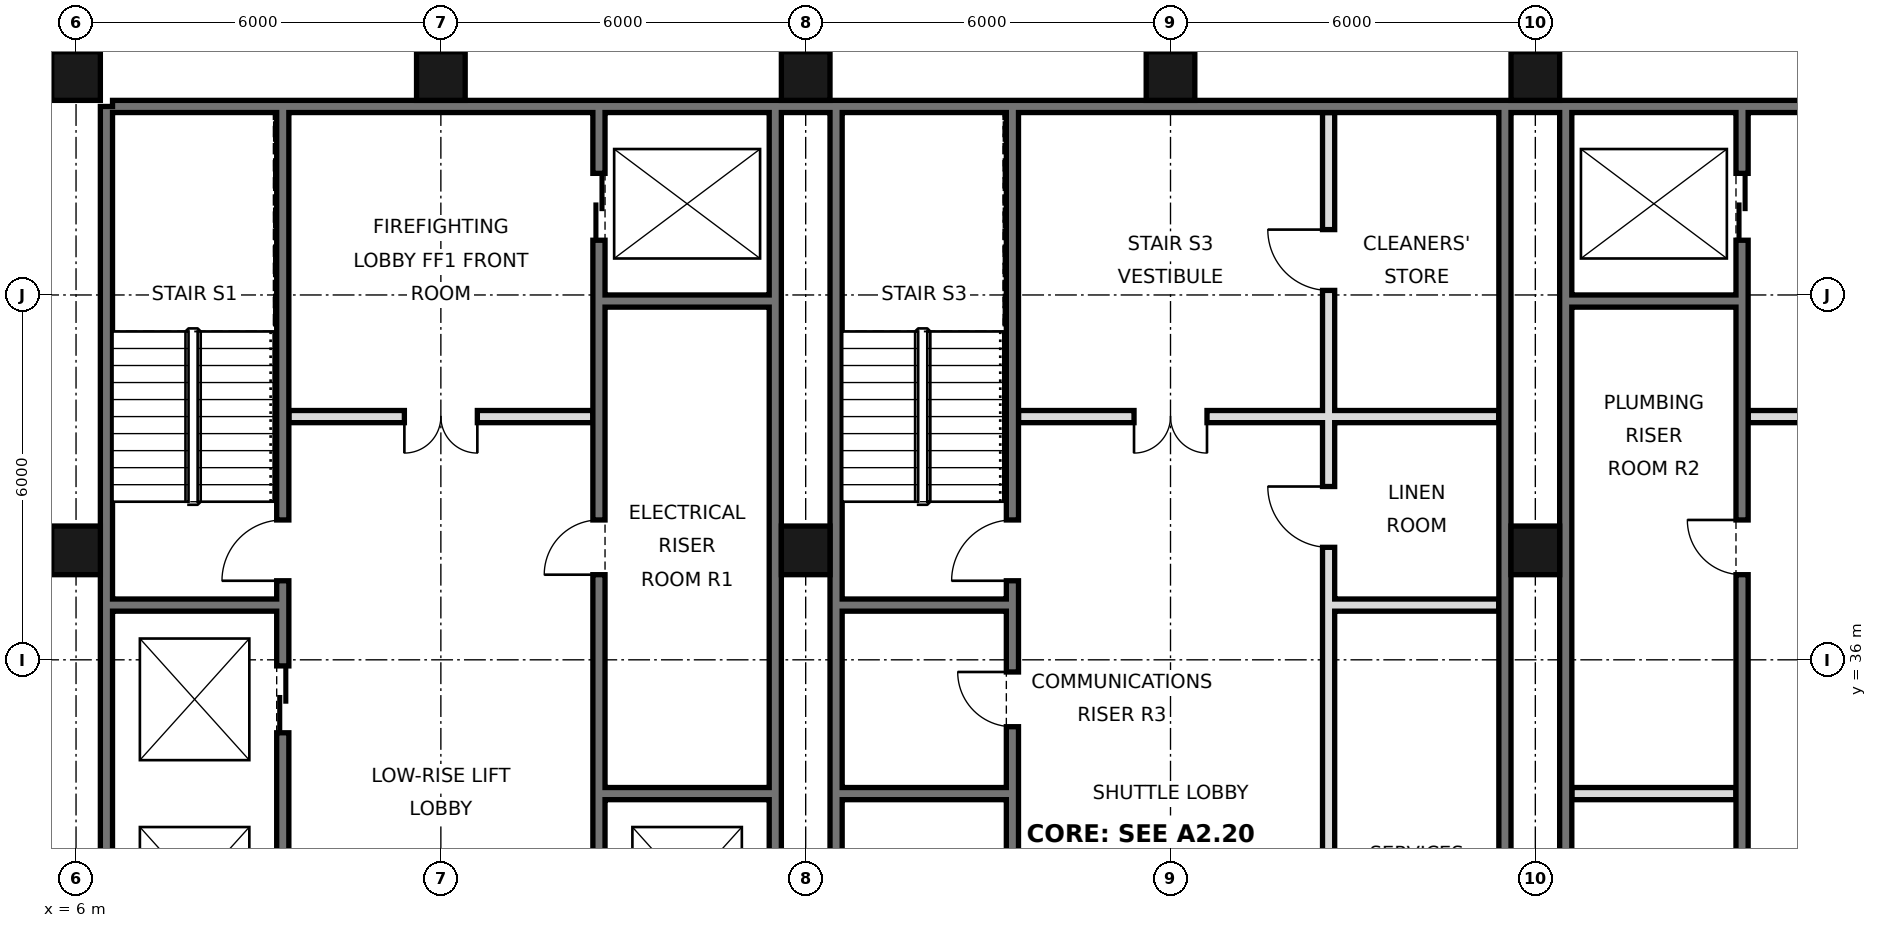
"""IFC4 building model, lengths in metres.
Left out: names, types, materials, properties, quantities, classifications, styles, units other than length and angle.
Written with IfcOpenShell. Run it as: python <this file> out.ifc"""

import sys

from ifc_helpers import new_model, si_unit, direction, frame, frame_2d, origin, origin_2d, place, context, subcontext, project, spatial, rectangle, hollow_rectangle, extrude, element, fill, save


model = new_model("IFC4")
c1 = context("Model", 3, precision=1e-05, world=origin(), true_north=direction((0.0, 1.0)))
c2 = subcontext(c1, "Body", "Model", "MODEL_VIEW")
j1 = project(units=[si_unit("LENGTHUNIT", "METRE"), si_unit("PLANEANGLEUNIT", "RADIAN")], contexts=[c1])
p1 = place(None, origin())
s1 = spatial("IfcSite", under=j1, at=p1, CompositionType="ELEMENT")
p2 = place(p1, origin())
s2 = spatial("IfcBuilding", under=s1, at=p2, CompositionType="ELEMENT")
p3 = place(p2, frame((0.0, 0.0, 78.6)))
s3 = spatial("IfcBuildingStorey", under=s2, at=p3, CompositionType="ELEMENT", Elevation=78.6)
for number, where, z_axis, x_axis in (
    (1, (6.0, 37.8, 0.0), (0.0, 0.0, 1.0), (1.0, 0.0, 0.0)),
    (2, (6.0, 45.6, 0.0), (0.0, 0.0, 1.0), (1.0, 0.0, 0.0)),
    (3, (12.0, 45.6, 0.0), (0.0, 0.0, 1.0), (1.0, 0.0, 0.0)),
    (4, (18.0, 37.8, 0.0), (0.0, 0.0, 1.0), (1.0, 0.0, 0.0)),
    (5, (18.0, 45.6, 0.0), (0.0, 0.0, 1.0), (1.0, 0.0, 0.0)),
    (6, (24.0, 45.6, 0.0), (0.0, 0.0, 1.0), (1.0, 0.0, 0.0)),
    (7, (30.0, 37.8, 0.0), (0.0, 0.0, 1.0), (1.0, 0.0, 0.0)),
    (8, (30.0, 45.6, 0.0), (0.0, 0.0, 1.0), (1.0, 0.0, 0.0)),
):
    element("IfcColumn", number, at=place(p3, frame(where, z_axis=z_axis, x_axis=x_axis)), inside=s3, PredefinedType="COLUMN", context=c2, shape_type="SweptSolid", body=[
        extrude(hollow_rectangle(XDim=0.8, YDim=0.8, WallThickness=0.06, at=origin_2d()), origin(), (0.0, 0.0, 1.0), 3.6),
    ])
p4 = place(p3, frame((6.5, 21.6, 0.0), z_axis=(0.0, 0.0, 1.0), x_axis=(0.0, 1.0, 0.0)))
e9 = element("IfcWall", 9, at=p4, inside=s3, PredefinedType="SOLIDWALL", context=c2, shape_type="SweptSolid", body=[
    extrude(rectangle(XDim=23.5, YDim=0.2, at=frame_2d((11.75, 0.0))), origin(), (0.0, 0.0, 1.0), 3.42),
])
p5 = place(p3, frame((6.6, 45.1, 0.0), z_axis=(0.0, 0.0, 1.0), x_axis=(1.0, 0.0, 0.0)))
e10 = element("IfcWall", 10, at=p5, inside=s3, PredefinedType="SOLIDWALL", context=c2, shape_type="SweptSolid", body=[
    extrude(rectangle(XDim=34.8, YDim=0.2, at=frame_2d((17.4, 0.0))), origin(), (0.0, 0.0, 1.0), 3.42),
])
for number, where, z_axis, x_axis in (
    (11, (17.5, 27.6, 0.0), (0.0, 0.0, 1.0), (0.0, 1.0, 0.0)),
    (12, (18.5, 27.6, 0.0), (0.0, 0.0, 1.0), (0.0, 1.0, 0.0)),
    (13, (29.5, 27.6, 0.0), (0.0, 0.0, 1.0), (0.0, 1.0, 0.0)),
    (14, (30.5, 27.6, 0.0), (0.0, 0.0, 1.0), (0.0, 1.0, 0.0)),
):
    element("IfcWall", number, at=place(p3, frame(where, z_axis=z_axis, x_axis=x_axis)), inside=s3, PredefinedType="SOLIDWALL", context=c2, shape_type="SweptSolid", body=[
        extrude(rectangle(XDim=17.5, YDim=0.2, at=frame_2d((8.75, 0.0))), origin(), (0.0, 0.0, 1.0), 3.42),
    ])
p6 = place(p3, frame((14.6, 27.5, 0.0), z_axis=(0.0, 0.0, 1.0), x_axis=(0.0, 1.0, 0.0)))
e15 = element("IfcWall", 15, at=p6, inside=s3, PredefinedType="SOLIDWALL", context=c2, shape_type="SweptSolid", body=[
    extrude(rectangle(XDim=17.5, YDim=0.2, at=frame_2d((8.75, 0.0))), origin(), (0.0, 0.0, 1.0), 3.42),
])
p7 = place(p6, frame((1.1, 0.0, 0.0)))
e16 = element("IfcOpeningElement", 16, at=p7, cuts=e15, PredefinedType="OPENING", context=c2, shape_type="SweptSolid", body=[
    extrude(rectangle(XDim=1.1, YDim=2.1, at=frame_2d((0.55, 1.05))), frame((0.0, 0.11, 0.0), z_axis=(0.0, -1.0, 0.0), x_axis=(1.0, 0.0, 0.0)), (0.0, 0.0, 1.0), 0.22),
])
p8 = place(p6, frame((4.2, 0.0, 0.0)))
e17 = element("IfcOpeningElement", 17, at=p8, cuts=e15, PredefinedType="OPENING", context=c2, shape_type="SweptSolid", body=[
    extrude(rectangle(XDim=1.1, YDim=2.1, at=frame_2d((0.55, 1.05))), frame((0.0, 0.11, 0.0), z_axis=(0.0, -1.0, 0.0), x_axis=(1.0, 0.0, 0.0)), (0.0, 0.0, 1.0), 0.22),
])
p9 = place(p6, frame((15.4, 0.0, 0.0)))
e18 = element("IfcOpeningElement", 18, at=p9, cuts=e15, PredefinedType="OPENING", context=c2, shape_type="SweptSolid", body=[
    extrude(rectangle(XDim=1.1, YDim=2.1, at=frame_2d((0.55, 1.05))), frame((0.0, 0.11, 0.0), z_axis=(0.0, -1.0, 0.0), x_axis=(1.0, 0.0, 0.0)), (0.0, 0.0, 1.0), 0.22),
])
p10 = place(p6, frame((9.9, 0.0, 0.0)))
e19 = element("IfcOpeningElement", 19, at=p10, cuts=e15, PredefinedType="OPENING", context=c2, shape_type="SweptSolid", body=[
    extrude(rectangle(XDim=0.9, YDim=2.1, at=frame_2d((0.45, 1.05))), frame((0.0, 0.11, 0.0), z_axis=(0.0, -1.0, 0.0), x_axis=(1.0, 0.0, 0.0)), (0.0, 0.0, 1.0), 0.22),
])
p11 = place(p3, frame((21.4, 27.5, 0.0), z_axis=(0.0, 0.0, 1.0), x_axis=(0.0, 1.0, 0.0)))
e20 = element("IfcWall", 20, at=p11, inside=s3, PredefinedType="SOLIDWALL", context=c2, shape_type="SweptSolid", body=[
    extrude(rectangle(XDim=17.5, YDim=0.2, at=frame_2d((8.75, 0.0))), origin(), (0.0, 0.0, 1.0), 3.42),
])
p12 = place(p11, frame((9.8, 0.0, 0.0)))
e21 = element("IfcOpeningElement", 21, at=p12, cuts=e20, PredefinedType="OPENING", context=c2, shape_type="SweptSolid", body=[
    extrude(rectangle(XDim=1.0, YDim=2.1, at=frame_2d((0.5, 1.05))), frame((0.0, 0.11, 0.0), z_axis=(0.0, -1.0, 0.0), x_axis=(1.0, 0.0, 0.0)), (0.0, 0.0, 1.0), 0.22),
])
p13 = place(p11, frame((7.4, 0.0, 0.0)))
e22 = element("IfcOpeningElement", 22, at=p13, cuts=e20, PredefinedType="OPENING", context=c2, shape_type="SweptSolid", body=[
    extrude(rectangle(XDim=0.9, YDim=2.1, at=frame_2d((0.45, 1.05))), frame((0.0, 0.11, 0.0), z_axis=(0.0, -1.0, 0.0), x_axis=(1.0, 0.0, 0.0)), (0.0, 0.0, 1.0), 0.22),
])
p14 = place(p3, frame((26.6, 27.5, 0.0), z_axis=(0.0, 0.0, 1.0), x_axis=(0.0, 1.0, 0.0)))
e23 = element("IfcWall", 23, at=p14, inside=s3, PredefinedType="SOLIDWALL", context=c2, shape_type="SweptSolid", body=[
    extrude(rectangle(XDim=17.5, YDim=0.2, at=frame_2d((8.75, 0.0))), origin(), (0.0, 0.0, 1.0), 3.42),
])
p15 = place(p14, frame((4.3, 0.0, 0.0)))
e24 = element("IfcOpeningElement", 24, at=p15, cuts=e23, PredefinedType="OPENING", context=c2, shape_type="SweptSolid", body=[
    extrude(rectangle(XDim=0.9, YDim=2.1, at=frame_2d((0.45, 1.05))), frame((0.0, 0.11, 0.0), z_axis=(0.0, -1.0, 0.0), x_axis=(1.0, 0.0, 0.0)), (0.0, 0.0, 1.0), 0.22),
])
p16 = place(p14, frame((10.35, 0.0, 0.0)))
e25 = element("IfcOpeningElement", 25, at=p16, cuts=e23, PredefinedType="OPENING", context=c2, shape_type="SweptSolid", body=[
    extrude(rectangle(XDim=1.0, YDim=2.1, at=frame_2d((0.5, 1.05))), frame((0.0, 0.11, 0.0), z_axis=(0.0, -1.0, 0.0), x_axis=(1.0, 0.0, 0.0)), (0.0, 0.0, 1.0), 0.22),
])
p17 = place(p14, frame((14.575, 0.0, 0.0)))
e26 = element("IfcOpeningElement", 26, at=p17, cuts=e23, PredefinedType="OPENING", context=c2, shape_type="SweptSolid", body=[
    extrude(rectangle(XDim=1.0, YDim=2.1, at=frame_2d((0.5, 1.05))), frame((0.0, 0.11, 0.0), z_axis=(0.0, -1.0, 0.0), x_axis=(1.0, 0.0, 0.0)), (0.0, 0.0, 1.0), 0.22),
])
p18 = place(p3, frame((33.4, 27.5, 0.0), z_axis=(0.0, 0.0, 1.0), x_axis=(0.0, 1.0, 0.0)))
e27 = element("IfcWall", 27, at=p18, inside=s3, PredefinedType="SOLIDWALL", context=c2, shape_type="SweptSolid", body=[
    extrude(rectangle(XDim=17.5, YDim=0.2, at=frame_2d((8.75, 0.0))), origin(), (0.0, 0.0, 1.0), 3.42),
])
p19 = place(p18, frame((15.4, 0.0, 0.0)))
e28 = element("IfcOpeningElement", 28, at=p19, cuts=e27, PredefinedType="OPENING", context=c2, shape_type="SweptSolid", body=[
    extrude(rectangle(XDim=1.1, YDim=2.1, at=frame_2d((0.55, 1.05))), frame((0.0, 0.11, 0.0), z_axis=(0.0, -1.0, 0.0), x_axis=(1.0, 0.0, 0.0)), (0.0, 0.0, 1.0), 0.22),
])
p20 = place(p18, frame((2.7, 0.0, 0.0)))
e29 = element("IfcOpeningElement", 29, at=p20, cuts=e27, PredefinedType="OPENING", context=c2, shape_type="SweptSolid", body=[
    extrude(rectangle(XDim=1.0, YDim=2.1, at=frame_2d((0.5, 1.05))), frame((0.0, 0.11, 0.0), z_axis=(0.0, -1.0, 0.0), x_axis=(1.0, 0.0, 0.0)), (0.0, 0.0, 1.0), 0.22),
])
p21 = place(p18, frame((9.9, 0.0, 0.0)))
e30 = element("IfcOpeningElement", 30, at=p21, cuts=e27, PredefinedType="OPENING", context=c2, shape_type="SweptSolid", body=[
    extrude(rectangle(XDim=0.9, YDim=2.1, at=frame_2d((0.45, 1.05))), frame((0.0, 0.11, 0.0), z_axis=(0.0, -1.0, 0.0), x_axis=(1.0, 0.0, 0.0)), (0.0, 0.0, 1.0), 0.22),
])
p22 = place(p3, frame((9.4, 21.6, 0.0), z_axis=(0.0, 0.0, 1.0), x_axis=(0.0, 1.0, 0.0)))
e31 = element("IfcWall", 31, at=p22, inside=s3, PredefinedType="SOLIDWALL", context=c2, shape_type="SweptSolid", body=[
    extrude(rectangle(XDim=23.4, YDim=0.2, at=frame_2d((11.7, 0.0))), origin(), (0.0, 0.0, 1.0), 3.42),
])
p23 = place(p22, frame((7.0, 0.0, 0.0)))
e32 = element("IfcOpeningElement", 32, at=p23, cuts=e31, PredefinedType="OPENING", context=c2, shape_type="SweptSolid", body=[
    extrude(rectangle(XDim=1.1, YDim=2.1, at=frame_2d((0.55, 1.05))), frame((0.0, 0.11, 0.0), z_axis=(0.0, -1.0, 0.0), x_axis=(1.0, 0.0, 0.0)), (0.0, 0.0, 1.0), 0.22),
])
p24 = place(p22, frame((10.1, 0.0, 0.0)))
e33 = element("IfcOpeningElement", 33, at=p24, cuts=e31, PredefinedType="OPENING", context=c2, shape_type="SweptSolid", body=[
    extrude(rectangle(XDim=1.1, YDim=2.1, at=frame_2d((0.55, 1.05))), frame((0.0, 0.11, 0.0), z_axis=(0.0, -1.0, 0.0), x_axis=(1.0, 0.0, 0.0)), (0.0, 0.0, 1.0), 0.22),
])
p25 = place(p22, frame((13.2, 0.0, 0.0)))
e34 = element("IfcOpeningElement", 34, at=p25, cuts=e31, PredefinedType="OPENING", context=c2, shape_type="SweptSolid", body=[
    extrude(rectangle(XDim=1.1, YDim=2.1, at=frame_2d((0.55, 1.05))), frame((0.0, 0.11, 0.0), z_axis=(0.0, -1.0, 0.0), x_axis=(1.0, 0.0, 0.0)), (0.0, 0.0, 1.0), 0.22),
])
p26 = place(p22, frame((15.7, 0.0, 0.0)))
e35 = element("IfcOpeningElement", 35, at=p26, cuts=e31, PredefinedType="OPENING", context=c2, shape_type="SweptSolid", body=[
    extrude(rectangle(XDim=1.0, YDim=2.1, at=frame_2d((0.5, 1.05))), frame((0.0, 0.11, 0.0), z_axis=(0.0, -1.0, 0.0), x_axis=(1.0, 0.0, 0.0)), (0.0, 0.0, 1.0), 0.22),
])
p27 = place(p22, frame((0.175, 0.0, 0.0)))
e36 = element("IfcOpeningElement", 36, at=p27, cuts=e31, PredefinedType="OPENING", context=c2, shape_type="SweptSolid", body=[
    extrude(rectangle(XDim=0.9, YDim=2.1, at=frame_2d((0.45, 1.05))), frame((0.0, 0.11, 0.0), z_axis=(0.0, -1.0, 0.0), x_axis=(1.0, 0.0, 0.0)), (0.0, 0.0, 1.0), 0.22),
])
for number, where, z_axis, x_axis in (
    (37, (14.7, 33.8, 0.0), (0.0, 0.0, 1.0), (1.0, 0.0, 0.0)),
    (38, (18.6, 33.8, 0.0), (0.0, 0.0, 1.0), (1.0, 0.0, 0.0)),
    (39, (30.6, 33.8, 0.0), (0.0, 0.0, 1.0), (1.0, 0.0, 0.0)),
    (40, (18.6, 36.9, 0.0), (0.0, 0.0, 1.0), (1.0, 0.0, 0.0)),
    (41, (26.7, 36.9, 0.0), (0.0, 0.0, 1.0), (1.0, 0.0, 0.0)),
    (42, (6.6, 36.9, 0.0), (0.0, 0.0, 1.0), (1.0, 0.0, 0.0)),
):
    element("IfcWall", number, at=place(p3, frame(where, z_axis=z_axis, x_axis=x_axis)), inside=s3, PredefinedType="SOLIDWALL", context=c2, shape_type="SweptSolid", body=[
        extrude(rectangle(XDim=2.7, YDim=0.2, at=frame_2d((1.35, 0.0))), origin(), (0.0, 0.0, 1.0), 3.42),
    ])
p28 = place(p3, frame((21.5, 40.0, 0.0), z_axis=(0.0, 0.0, 1.0), x_axis=(1.0, 0.0, 0.0)))
e43 = element("IfcWall", 43, at=p28, inside=s3, PredefinedType="PARTITIONING", context=c2, shape_type="SweptSolid", body=[
    extrude(rectangle(XDim=7.9, YDim=0.2, at=frame_2d((3.95, 0.0))), origin(), (0.0, 0.0, 1.0), 3.42),
])
p29 = place(p28, frame((1.9, 0.0, 0.0)))
e44 = element("IfcOpeningElement", 44, at=p29, cuts=e43, PredefinedType="OPENING", context=c2, shape_type="SweptSolid", body=[
    extrude(rectangle(XDim=1.2, YDim=2.1, at=frame_2d((0.6, 1.05))), frame((0.0, 0.11, 0.0), z_axis=(0.0, -1.0, 0.0), x_axis=(1.0, 0.0, 0.0)), (0.0, 0.0, 1.0), 0.22),
])
p30 = place(p3, frame((33.5, 40.0, 0.0), z_axis=(0.0, 0.0, 1.0), x_axis=(1.0, 0.0, 0.0)))
e45 = element("IfcWall", 45, at=p30, inside=s3, PredefinedType="PARTITIONING", context=c2, shape_type="SweptSolid", body=[
    extrude(rectangle(XDim=5.0, YDim=0.2, at=frame_2d((2.5, 0.0))), origin(), (0.0, 0.0, 1.0), 3.42),
])
p31 = place(p30, frame((1.9, 0.0, 0.0)))
e46 = element("IfcOpeningElement", 46, at=p31, cuts=e45, PredefinedType="OPENING", context=c2, shape_type="SweptSolid", body=[
    extrude(rectangle(XDim=1.2, YDim=2.1, at=frame_2d((0.6, 1.05))), frame((0.0, 0.11, 0.0), z_axis=(0.0, -1.0, 0.0), x_axis=(1.0, 0.0, 0.0)), (0.0, 0.0, 1.0), 0.22),
])
p32 = place(p3, frame((9.5, 40.0, 0.0), z_axis=(0.0, 0.0, 1.0), x_axis=(1.0, 0.0, 0.0)))
e47 = element("IfcWall", 47, at=p32, inside=s3, PredefinedType="PARTITIONING", context=c2, shape_type="SweptSolid", body=[
    extrude(rectangle(XDim=5.0, YDim=0.2, at=frame_2d((2.5, 0.0))), origin(), (0.0, 0.0, 1.0), 3.42),
])
p33 = place(p32, frame((1.9, 0.0, 0.0)))
e48 = element("IfcOpeningElement", 48, at=p33, cuts=e47, PredefinedType="OPENING", context=c2, shape_type="SweptSolid", body=[
    extrude(rectangle(XDim=1.2, YDim=2.1, at=frame_2d((0.6, 1.05))), frame((0.0, 0.11, 0.0), z_axis=(0.0, -1.0, 0.0), x_axis=(1.0, 0.0, 0.0)), (0.0, 0.0, 1.0), 0.22),
])
for number, where, z_axis, x_axis in (
    (49, (14.7, 41.9, 0.0), (0.0, 0.0, 1.0), (1.0, 0.0, 0.0)),
    (50, (30.6, 41.9, 0.0), (0.0, 0.0, 1.0), (1.0, 0.0, 0.0)),
):
    element("IfcWall", number, at=place(p3, frame(where, z_axis=z_axis, x_axis=x_axis)), inside=s3, PredefinedType="SOLIDWALL", context=c2, shape_type="SweptSolid", body=[
        extrude(rectangle(XDim=2.7, YDim=0.2, at=frame_2d((1.35, 0.0))), origin(), (0.0, 0.0, 1.0), 3.42),
    ])
p34 = place(p33, frame((1.2, 0.0, 0.0), z_axis=(0.0, 0.0, 1.0), x_axis=(-1.0, 0.0, 0.0)))
e51 = element("IfcDoor", 51, at=p34, inside=s3, OperationType="DOUBLE_DOOR_SINGLE_SWING", PredefinedType="DOOR", context=c2, shape_type="SweptSolid", body=[
    extrude(rectangle(XDim=1.2, YDim=2.1, at=frame_2d((0.6, 1.05))), frame((0.0, 0.025, 0.0), z_axis=(0.0, -1.0, 0.0), x_axis=(1.0, 0.0, 0.0)), (0.0, 0.0, 1.0), 0.05),
])
fill(e48, e51)
p35 = place(p29, frame((1.2, 0.0, 0.0), z_axis=(0.0, 0.0, 1.0), x_axis=(-1.0, 0.0, 0.0)))
e52 = element("IfcDoor", 52, at=p35, inside=s3, OperationType="DOUBLE_DOOR_SINGLE_SWING", PredefinedType="DOOR", context=c2, shape_type="SweptSolid", body=[
    extrude(rectangle(XDim=1.2, YDim=2.1, at=frame_2d((0.6, 1.05))), frame((0.0, 0.025, 0.0), z_axis=(0.0, -1.0, 0.0), x_axis=(1.0, 0.0, 0.0)), (0.0, 0.0, 1.0), 0.05),
])
fill(e44, e52)
p36 = place(p19, origin())
e53 = element("IfcDoor", 53, at=p36, inside=s3, OperationType="DOUBLE_DOOR_SLIDING", PredefinedType="DOOR", context=c2, shape_type="SweptSolid", body=[
    extrude(rectangle(XDim=1.1, YDim=2.1, at=frame_2d((0.55, 1.05))), frame((0.0, 0.025, 0.0), z_axis=(0.0, -1.0, 0.0), x_axis=(1.0, 0.0, 0.0)), (0.0, 0.0, 1.0), 0.05),
])
fill(e28, e53)
p37 = place(p9, origin())
e54 = element("IfcDoor", 54, at=p37, inside=s3, OperationType="DOUBLE_DOOR_SLIDING", PredefinedType="DOOR", context=c2, shape_type="SweptSolid", body=[
    extrude(rectangle(XDim=1.1, YDim=2.1, at=frame_2d((0.55, 1.05))), frame((0.0, 0.025, 0.0), z_axis=(0.0, -1.0, 0.0), x_axis=(1.0, 0.0, 0.0)), (0.0, 0.0, 1.0), 0.05),
])
fill(e18, e54)
p38 = place(p25, origin())
e55 = element("IfcDoor", 55, at=p38, inside=s3, OperationType="DOUBLE_DOOR_SLIDING", PredefinedType="DOOR", context=c2, shape_type="SweptSolid", body=[
    extrude(rectangle(XDim=1.1, YDim=2.1, at=frame_2d((0.55, 1.05))), frame((0.0, 0.025, 0.0), z_axis=(0.0, -1.0, 0.0), x_axis=(1.0, 0.0, 0.0)), (0.0, 0.0, 1.0), 0.05),
])
fill(e34, e55)
p39 = place(p26, origin())
e56 = element("IfcDoor", 56, at=p39, inside=s3, OperationType="SINGLE_SWING_LEFT", PredefinedType="DOOR", context=c2, shape_type="SweptSolid", body=[
    extrude(rectangle(XDim=1.0, YDim=2.1, at=frame_2d((0.5, 1.05))), frame((0.0, 0.025, 0.0), z_axis=(0.0, -1.0, 0.0), x_axis=(1.0, 0.0, 0.0)), (0.0, 0.0, 1.0), 0.05),
])
fill(e35, e56)
p40 = place(p12, origin())
e57 = element("IfcDoor", 57, at=p40, inside=s3, OperationType="SINGLE_SWING_LEFT", PredefinedType="DOOR", context=c2, shape_type="SweptSolid", body=[
    extrude(rectangle(XDim=1.0, YDim=2.1, at=frame_2d((0.5, 1.05))), frame((0.0, 0.025, 0.0), z_axis=(0.0, -1.0, 0.0), x_axis=(1.0, 0.0, 0.0)), (0.0, 0.0, 1.0), 0.05),
])
fill(e21, e57)
p41 = place(p10, origin())
e58 = element("IfcDoor", 58, at=p41, inside=s3, OperationType="SINGLE_SWING_LEFT", PredefinedType="DOOR", context=c2, shape_type="SweptSolid", body=[
    extrude(rectangle(XDim=0.9, YDim=2.1, at=frame_2d((0.45, 1.05))), frame((0.0, 0.025, 0.0), z_axis=(0.0, -1.0, 0.0), x_axis=(1.0, 0.0, 0.0)), (0.0, 0.0, 1.0), 0.05),
])
fill(e19, e58)
p42 = place(p21, frame((0.9, 0.0, 0.0), z_axis=(0.0, 0.0, 1.0), x_axis=(-1.0, 0.0, 0.0)))
e59 = element("IfcDoor", 59, at=p42, inside=s3, OperationType="SINGLE_SWING_LEFT", PredefinedType="DOOR", context=c2, shape_type="SweptSolid", body=[
    extrude(rectangle(XDim=0.9, YDim=2.1, at=frame_2d((0.45, 1.05))), frame((0.0, 0.025, 0.0), z_axis=(0.0, -1.0, 0.0), x_axis=(1.0, 0.0, 0.0)), (0.0, 0.0, 1.0), 0.05),
])
fill(e30, e59)
p43 = place(p13, frame((0.9, 0.0, 0.0), z_axis=(0.0, 0.0, 1.0), x_axis=(-1.0, 0.0, 0.0)))
e60 = element("IfcDoor", 60, at=p43, inside=s3, OperationType="SINGLE_SWING_LEFT", PredefinedType="DOOR", context=c2, shape_type="SweptSolid", body=[
    extrude(rectangle(XDim=0.9, YDim=2.1, at=frame_2d((0.45, 1.05))), frame((0.0, 0.025, 0.0), z_axis=(0.0, -1.0, 0.0), x_axis=(1.0, 0.0, 0.0)), (0.0, 0.0, 1.0), 0.05),
])
fill(e22, e60)
p44 = place(p16, frame((1.0, 0.0, 0.0), z_axis=(0.0, 0.0, 1.0), x_axis=(-1.0, 0.0, 0.0)))
e61 = element("IfcDoor", 61, at=p44, inside=s3, OperationType="SINGLE_SWING_LEFT", PredefinedType="DOOR", context=c2, shape_type="SweptSolid", body=[
    extrude(rectangle(XDim=1.0, YDim=2.1, at=frame_2d((0.5, 1.05))), frame((0.0, 0.025, 0.0), z_axis=(0.0, -1.0, 0.0), x_axis=(1.0, 0.0, 0.0)), (0.0, 0.0, 1.0), 0.05),
])
fill(e25, e61)
p45 = place(p17, frame((1.0, 0.0, 0.0), z_axis=(0.0, 0.0, 1.0), x_axis=(-1.0, 0.0, 0.0)))
e62 = element("IfcDoor", 62, at=p45, inside=s3, OperationType="SINGLE_SWING_LEFT", PredefinedType="DOOR", context=c2, shape_type="SweptSolid", body=[
    extrude(rectangle(XDim=1.0, YDim=2.1, at=frame_2d((0.5, 1.05))), frame((0.0, 0.025, 0.0), z_axis=(0.0, -1.0, 0.0), x_axis=(1.0, 0.0, 0.0)), (0.0, 0.0, 1.0), 0.05),
])
fill(e26, e62)
save(model, sys.argv[1])
